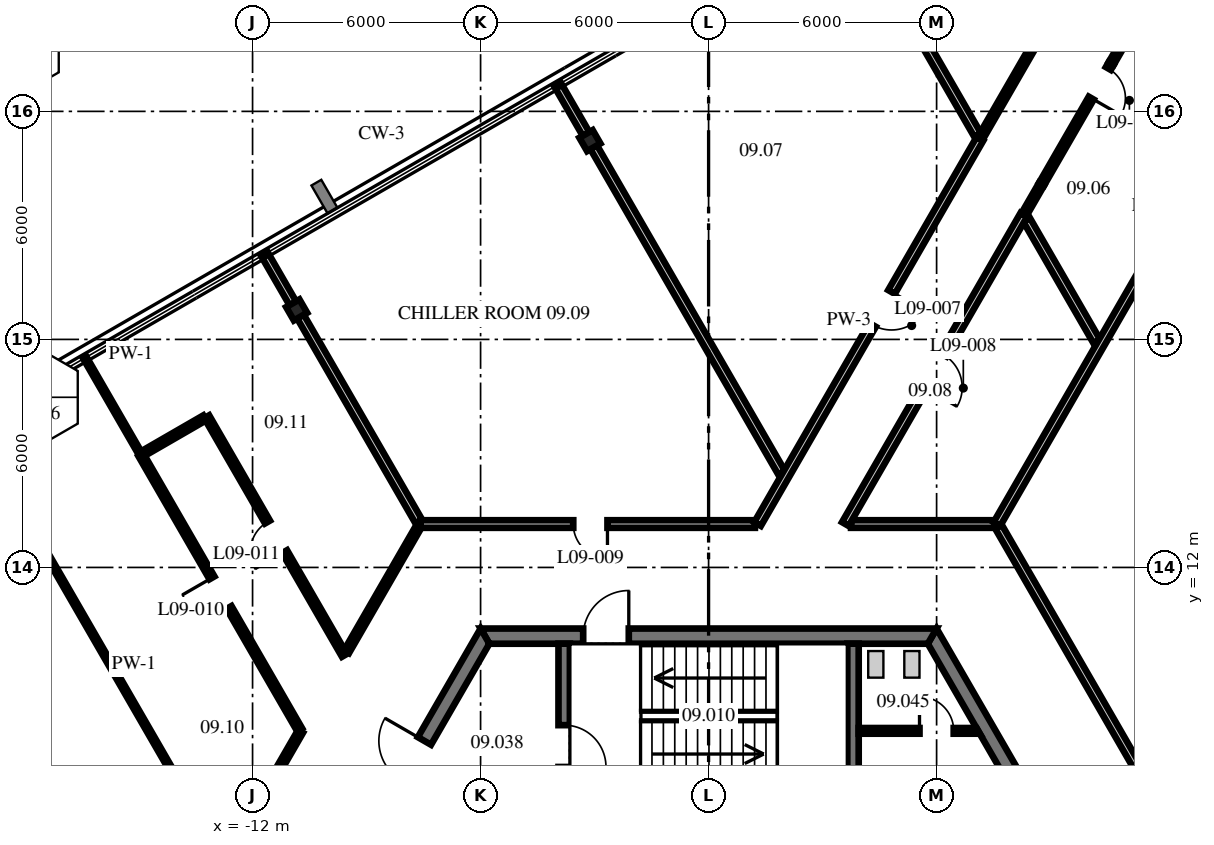
"""IFC4 building model, lengths in metres.
Left out: names, types, materials, properties, quantities, classifications, styles, units other than length and angle.
Written with IfcOpenShell. Run it as: python <this file> out.ifc"""

import sys

from ifc_helpers import new_model, si_unit, direction, frame, frame_2d, origin, origin_2d, place, context, subcontext, project, spatial, polyline, rectangle, i_section, outline, extrude, source, transform, mapped, element, fill, save


model = new_model("IFC4")
c1 = context("Model", 3, precision=1e-05, world=origin(), true_north=direction((0.0, 1.0)))
c2 = subcontext(c1, "Body", "Model", "MODEL_VIEW")
j1 = project(units=[si_unit("LENGTHUNIT", "METRE"), si_unit("PLANEANGLEUNIT", "RADIAN")], contexts=[c1])
p1 = place(None, origin())
s1 = spatial("IfcSite", under=j1, at=p1, CompositionType="ELEMENT")
p2 = place(p1, origin())
s2 = spatial("IfcBuilding", under=s1, at=p2, CompositionType="ELEMENT")
p3 = place(p2, frame((0.0, 0.0, 41.8)))
s3 = spatial("IfcBuildingStorey", under=s2, at=p3, CompositionType="ELEMENT", Elevation=41.8)
m1 = source(origin(), c2, "Body", "SweptSolid", [
    extrude(i_section(OverallWidth=0.404, OverallDepth=0.406, WebThickness=0.027, FlangeThickness=0.044, at=origin_2d()), origin(), (0.0, 0.0, 1.0), 4.3),
])
for number, where, z_axis, x_axis in (
    (1, (-3.124, 23.23, 0.0), (0.0, 0.0, 1.0), (-0.866, -0.5, 0.0)),
    (2, (-10.84, 18.775, 0.0), (0.0, 0.0, 1.0), (-0.866, -0.5, 0.0)),
):
    element("IfcColumn", number, at=place(p3, frame(where, z_axis=z_axis, x_axis=x_axis)), inside=s3, PredefinedType="COLUMN", context=c2, shape_type="MappedRepresentation", body=[
        mapped(m1, transform((0.0, 0.0, 0.0), scale=1.0)),
    ])
m2 = source(origin(), c2, "Body", "SweptSolid", [
    extrude(outline(polyline([(-0.115, -0.2), (11.885, -0.2), (11.654, 0.2), (0.115, 0.2), (-0.115, -0.2)])), origin(), (0.0, 0.0, 1.0), 4.1),
])
p4 = place(p3, frame((11.769, 0.0, 0.0), z_axis=(0.0, 0.0, 1.0), x_axis=(-0.499996592174, 0.866027371285, 0.0)))
e3 = element("IfcWall", 3, at=p4, inside=s3, PredefinedType="SHEAR", context=c2, shape_type="MappedRepresentation", body=[
    mapped(m2, transform((0.0, 0.0, 0.0), scale=1.0)),
])
p5 = place(p4, frame((5.75, 0.0, 0.0)))
e4 = element("IfcOpeningElement", 4, at=p5, cuts=e3, PredefinedType="OPENING", context=c2, shape_type="SweptSolid", body=[
    extrude(rectangle(XDim=1.2, YDim=2.1, at=frame_2d((0.6, 1.05))), frame((0.0, 0.21, 0.0), z_axis=(0.0, -1.0, 0.0), x_axis=(1.0, 0.0, 0.0)), (0.0, 0.0, 1.0), 0.42),
])
p6 = place(p3, frame((5.885, 10.192, 0.0), z_axis=(0.0, 0.0, 1.0), x_axis=(-1.0, 0.0, 0.0)))
e5 = element("IfcWall", 5, at=p6, inside=s3, PredefinedType="SHEAR", context=c2, shape_type="MappedRepresentation", body=[
    mapped(m2, transform((0.0, 0.0, 0.0), scale=1.0)),
])
p7 = place(p6, frame((7.985, 0.0, 0.0)))
e6 = element("IfcOpeningElement", 6, at=p7, cuts=e5, PredefinedType="OPENING", context=c2, shape_type="SweptSolid", body=[
    extrude(rectangle(XDim=1.2, YDim=2.1, at=frame_2d((0.6, 1.05))), frame((0.0, 0.21, 0.0), z_axis=(0.0, -1.0, 0.0), x_axis=(1.0, 0.0, 0.0)), (0.0, 0.0, 1.0), 0.42),
])
p8 = place(p3, frame((-5.885, 10.192, 0.0), z_axis=(0.0, 0.0, 1.0), x_axis=(-0.499996592174, -0.866027371285, 0.0)))
e7 = element("IfcWall", 7, at=p8, inside=s3, PredefinedType="SHEAR", context=c2, shape_type="MappedRepresentation", body=[
    mapped(m2, transform((0.0, 0.0, 0.0), scale=1.0)),
])
p9 = place(p8, frame((3.185, 0.0, 0.0)))
e8 = element("IfcOpeningElement", 8, at=p9, cuts=e7, PredefinedType="OPENING", context=c2, shape_type="SweptSolid", body=[
    extrude(rectangle(XDim=1.2, YDim=2.1, at=frame_2d((0.6, 1.05))), frame((0.0, 0.21, 0.0), z_axis=(0.0, -1.0, 0.0), x_axis=(1.0, 0.0, 0.0)), (0.0, 0.0, 1.0), 0.42),
])
m3 = source(origin(), c2, "Body", "SweptSolid", [
    extrude(outline(polyline([(0.0, -0.15), (0.0, 0.15), (3.804, 0.15), (3.804, -0.15), (0.0, -0.15)])), origin(), (0.0, 0.0, 1.0), 4.1),
])
p10 = place(p3, frame((-3.8, 6.19, 0.0), z_axis=(0.0, 0.0, 1.0), x_axis=(0.0, 1.0, 0.0)))
e9 = element("IfcWall", 9, at=p10, inside=s3, PredefinedType="SHEAR", context=c2, shape_type="MappedRepresentation", body=[
    mapped(m3, transform((0.0, 0.0, 0.0), scale=1.0)),
])
p11 = place(p10, frame((0.56, 0.0, 0.0)))
e10 = element("IfcOpeningElement", 10, at=p11, cuts=e9, PredefinedType="OPENING", context=c2, shape_type="SweptSolid", body=[
    extrude(rectangle(XDim=1.1, YDim=2.1, at=frame_2d((0.55, 1.05))), frame((0.0, 0.16, 0.0), z_axis=(0.0, -1.0, 0.0), x_axis=(1.0, 0.0, 0.0)), (0.0, 0.0, 1.0), 0.32),
])
p12 = place(p3, frame((3.8, 6.19, 0.0), z_axis=(0.0, 0.0, 1.0), x_axis=(0.0, 1.0, 0.0)))
e11 = element("IfcWall", 11, at=p12, inside=s3, PredefinedType="SHEAR", context=c2, shape_type="MappedRepresentation", body=[
    mapped(m3, transform((0.0, 0.0, 0.0), scale=1.0)),
])
m4 = source(origin(), c2, "Body", "SweptSolid", [
    extrude(outline(polyline([(0.0, -0.075), (0.0, 0.075), (3.102, 0.075), (3.188, -0.075), (0.0, -0.075)])), origin(), (0.0, 0.0, 1.0), 4.1),
])
p13 = place(p3, frame((3.95, 7.7, 0.0), z_axis=(0.0, 0.0, 1.0), x_axis=(1.0, 0.0, 0.0)))
e12 = element("IfcWall", 12, at=p13, inside=s3, PredefinedType="PARTITIONING", context=c2, shape_type="MappedRepresentation", body=[
    mapped(m4, transform((0.0, 0.0, 0.0), scale=1.0)),
])
p14 = place(p13, frame((1.6, 0.0, 0.0)))
e13 = element("IfcOpeningElement", 13, at=p14, cuts=e12, PredefinedType="OPENING", context=c2, shape_type="SweptSolid", body=[
    extrude(rectangle(XDim=0.9, YDim=2.1, at=frame_2d((0.45, 1.05))), frame((0.0, 0.085, 0.0), z_axis=(0.0, -1.0, 0.0), x_axis=(1.0, 0.0, 0.0)), (0.0, 0.0, 1.0), 0.17),
])
m5 = source(origin(), c2, "Body", "SweptSolid", [
    extrude(rectangle(XDim=11.455, YDim=0.1, at=frame_2d((5.728, 0.0))), origin(), (0.0, 0.0, 1.0), 3.343),
])
p15 = place(p3, frame((-18.459, 14.153, 0.0), z_axis=(0.0, 0.0, 1.0), x_axis=(0.500008416231, -0.866020544617, 0.0)))
e14 = element("IfcWall", 14, at=p15, inside=s3, PredefinedType="PARTITIONING", context=c2, shape_type="MappedRepresentation", body=[
    mapped(m5, transform((0.0, 0.0, 0.0), scale=1.0)),
])
p16 = place(p3, frame((-16.41, 17.513, 0.0), z_axis=(0.0, 0.0, 1.0), x_axis=(0.500041054325, -0.866001699761, 0.0)))
e15 = element("IfcWall", 15, at=p16, inside=s3, PredefinedType="PARTITIONING", context=c2, shape_type="SweptSolid", body=[
    extrude(rectangle(XDim=2.941, YDim=0.1, at=frame_2d((1.47, 0.0))), origin(), (0.0, 0.0, 1.0), 4.1),
])
p17 = place(p3, frame((-14.939, 14.965, 0.0), z_axis=(0.0, 0.0, 1.0), x_axis=(0.499977133552, -0.866038605332, 0.0)))
e16 = element("IfcWall", 16, at=p17, inside=s3, PredefinedType="PARTITIONING", context=c2, shape_type="SweptSolid", body=[
    extrude(rectangle(XDim=8.354, YDim=0.15, at=frame_2d((4.177, 0.0))), origin(), (0.0, 0.0, 1.0), 4.1),
])
p18 = place(p17, frame((3.74, 0.0, 0.0)))
e17 = element("IfcOpeningElement", 17, at=p18, cuts=e16, PredefinedType="OPENING", context=c2, shape_type="SweptSolid", body=[
    extrude(rectangle(XDim=0.9, YDim=2.1, at=frame_2d((0.45, 1.05))), frame((0.0, 0.085, 0.0), z_axis=(0.0, -1.0, 0.0), x_axis=(1.0, 0.0, 0.0)), (0.0, 0.0, 1.0), 0.17),
])
m6 = source(origin(), c2, "Body", "SweptSolid", [
    extrude(rectangle(XDim=7.249, YDim=0.15, at=frame_2d((3.625, 0.0))), origin(), (0.0, 0.0, 1.0), 4.1),
])
p19 = place(p3, frame((-13.207, 15.965, 0.0), z_axis=(0.0, 0.0, 1.0), x_axis=(0.500014967241, -0.866016762271, 0.0)))
e18 = element("IfcWall", 18, at=p19, inside=s3, PredefinedType="PARTITIONING", context=c2, shape_type="MappedRepresentation", body=[
    mapped(m6, transform((0.0, 0.0, 0.0), scale=1.0)),
])
p20 = place(p19, frame((3.199, 0.0, 0.0)))
e19 = element("IfcOpeningElement", 19, at=p20, cuts=e18, PredefinedType="OPENING", context=c2, shape_type="SweptSolid", body=[
    extrude(rectangle(XDim=0.9, YDim=2.1, at=frame_2d((0.45, 1.05))), frame((0.0, 0.085, 0.0), z_axis=(0.0, -1.0, 0.0), x_axis=(1.0, 0.0, 0.0)), (0.0, 0.0, 1.0), 0.17),
])
m7 = source(origin(), c2, "Body", "SweptSolid", [
    extrude(rectangle(XDim=1.499, YDim=0.2, at=frame_2d((0.749, 0.0))), origin(), (0.0, 0.0, 1.0), 4.1),
])
p21 = place(p3, frame((-11.686, 20.24, 0.0), z_axis=(0.0, 0.0, 1.0), x_axis=(0.499976292358, -0.866039090965, 0.0)))
e20 = element("IfcWall", 20, at=p21, inside=s3, PredefinedType="PARTITIONING", context=c2, shape_type="MappedRepresentation", body=[
    mapped(m7, transform((0.0, 0.0, 0.0), scale=1.0)),
])
m8 = source(origin(), c2, "Body", "SweptSolid", [
    extrude(rectangle(XDim=6.241, YDim=0.2, at=frame_2d((3.121, 0.0))), origin(), (0.0, 0.0, 1.0), 3.488),
])
p22 = place(p3, frame((-10.743, 18.608, 0.0), z_axis=(0.0, 0.0, 1.0), x_axis=(0.499988843237, -0.866031845049, 0.0)))
e21 = element("IfcWall", 21, at=p22, inside=s3, PredefinedType="PARTITIONING", context=c2, shape_type="MappedRepresentation", body=[
    mapped(m8, transform((0.0, 0.0, 0.0), scale=1.0)),
])
m9 = source(origin(), c2, "Body", "SweptSolid", [
    extrude(rectangle(XDim=1.499, YDim=0.2, at=frame_2d((0.75, 0.0))), origin(), (0.0, 0.0, 1.0), 4.1),
])
p23 = place(p3, frame((-3.969, 24.695, 0.0), z_axis=(0.0, 0.0, 1.0), x_axis=(0.499905760005, -0.866079806435, 0.0)))
e22 = element("IfcWall", 22, at=p23, inside=s3, PredefinedType="PARTITIONING", context=c2, shape_type="MappedRepresentation", body=[
    mapped(m9, transform((0.0, 0.0, 0.0), scale=1.0)),
])
m10 = source(origin(), c2, "Body", "SweptSolid", [
    extrude(rectangle(XDim=9.893, YDim=0.2, at=frame_2d((4.947, 0.0))), origin(), (0.0, 0.0, 1.0), 3.343),
])
p24 = place(p3, frame((-3.027, 23.063, 0.0), z_axis=(0.0, 0.0, 1.0), x_axis=(0.499990184253, -0.866031070834, 0.0)))
e23 = element("IfcWall", 23, at=p24, inside=s3, PredefinedType="PARTITIONING", context=c2, shape_type="MappedRepresentation", body=[
    mapped(m10, transform((0.0, 0.0, 0.0), scale=1.0)),
])
p25 = place(p3, frame((7.623, 13.082, 0.0), z_axis=(0.0, 0.0, 1.0), x_axis=(0.499985944963, -0.866033518312, 0.0)))
e24 = element("IfcWall", 24, at=p25, inside=s3, PredefinedType="PARTITIONING", context=c2, shape_type="SweptSolid", body=[
    extrude(rectangle(XDim=15.105, YDim=0.2, at=frame_2d((7.553, 0.0))), origin(), (0.0, 0.0, 1.0), 4.1),
])
p26 = place(p25, frame((9.455, 0.0, 0.0)))
e25 = element("IfcOpeningElement", 25, at=p26, cuts=e24, PredefinedType="OPENING", context=c2, shape_type="SweptSolid", body=[
    extrude(rectangle(XDim=1.0, YDim=2.1, at=frame_2d((0.5, 1.05))), frame((0.0, 0.11, 0.0), z_axis=(0.0, -1.0, 0.0), x_axis=(1.0, 0.0, 0.0)), (0.0, 0.0, 1.0), 0.22),
])
m11 = source(origin(), c2, "Body", "SweptSolid", [
    extrude(rectangle(XDim=4.779, YDim=0.2, at=frame_2d((2.389, 0.0))), origin(), (0.0, 0.0, 1.0), 3.488),
])
p27 = place(p3, frame((4.689, 27.518, 0.0), z_axis=(0.0, 0.0, 1.0), x_axis=(0.499990736708, -0.866030751883, 0.0)))
e26 = element("IfcWall", 26, at=p27, inside=s3, PredefinedType="PARTITIONING", context=c2, shape_type="MappedRepresentation", body=[
    mapped(m11, transform((0.0, 0.0, 0.0), scale=1.0)),
])
p28 = place(p3, frame((8.369, 21.145, 0.0), z_axis=(0.0, 0.0, 1.0), x_axis=(0.499982117899, -0.866035727774, 0.0)))
e27 = element("IfcWall", 27, at=p28, inside=s3, PredefinedType="PARTITIONING", context=c2, shape_type="SweptSolid", body=[
    extrude(rectangle(XDim=3.69, YDim=0.2, at=frame_2d((1.845, 0.0))), origin(), (0.0, 0.0, 1.0), 4.1),
])
p29 = place(p3, frame((-7.588, 13.142, 0.0), z_axis=(0.0, 0.0, 1.0), x_axis=(1.0, 0.0, 0.0)))
e28 = element("IfcWall", 28, at=p29, inside=s3, PredefinedType="PARTITIONING", context=c2, shape_type="SweptSolid", body=[
    extrude(rectangle(XDim=8.807, YDim=0.2, at=frame_2d((4.403, 0.0))), origin(), (0.0, 0.0, 1.0), 4.1),
])
p30 = place(p29, frame((4.027, 0.0, 0.0)))
e29 = element("IfcOpeningElement", 29, at=p30, cuts=e28, PredefinedType="OPENING", context=c2, shape_type="SweptSolid", body=[
    extrude(rectangle(XDim=0.9, YDim=2.1, at=frame_2d((0.45, 1.05))), frame((0.0, 0.11, 0.0), z_axis=(0.0, -1.0, 0.0), x_axis=(1.0, 0.0, 0.0)), (0.0, 0.0, 1.0), 0.22),
])
p31 = place(p3, frame((3.748, 13.142, 0.0), z_axis=(0.0, 0.0, 1.0), x_axis=(1.0, 0.0, 0.0)))
e30 = element("IfcWall", 30, at=p31, inside=s3, PredefinedType="PARTITIONING", context=c2, shape_type="SweptSolid", body=[
    extrude(rectangle(XDim=3.769, YDim=0.2, at=frame_2d((1.885, 0.0))), origin(), (0.0, 0.0, 1.0), 4.1),
])
m12 = source(origin(), c2, "Body", "SweptSolid", [
    extrude(rectangle(XDim=1.89, YDim=0.15, at=frame_2d((0.945, 0.0))), origin(), (0.0, 0.0, 1.0), 4.1),
])
p32 = place(p3, frame((-14.896, 14.991, 0.0), z_axis=(0.0, 0.0, 1.0), x_axis=(0.866000578957, 0.500042995397, 0.0)))
e31 = element("IfcWall", 31, at=p32, inside=s3, PredefinedType="PARTITIONING", context=c2, shape_type="MappedRepresentation", body=[
    mapped(m12, transform((0.0, 0.0, 0.0), scale=1.0)),
])
p33 = place(p3, frame((7.588, 13.142, 0.0), z_axis=(0.0, 0.0, 1.0), x_axis=(0.500005822324, 0.866022042238, 0.0)))
e32 = element("IfcWall", 32, at=p33, inside=s3, PredefinedType="PARTITIONING", context=c2, shape_type="SweptSolid", body=[
    extrude(rectangle(XDim=18.62, YDim=0.2, at=frame_2d((9.31, 0.0))), origin(), (0.0, 0.0, 1.0), 4.1),
])
p34 = place(p3, frame((3.598, 13.142, 0.0), z_axis=(0.0, 0.0, 1.0), x_axis=(0.499987908195, 0.866032384879, 0.0)))
e33 = element("IfcWall", 33, at=p34, inside=s3, PredefinedType="PARTITIONING", context=c2, shape_type="SweptSolid", body=[
    extrude(rectangle(XDim=9.394, YDim=0.2, at=frame_2d((4.697, 0.0))), origin(), (0.0, 0.0, 1.0), 4.1),
])
p35 = place(p34, frame((4.15, 0.0, 0.0)))
e34 = element("IfcOpeningElement", 34, at=p35, cuts=e33, PredefinedType="OPENING", context=c2, shape_type="SweptSolid", body=[
    extrude(rectangle(XDim=1.0, YDim=2.1, at=frame_2d((0.5, 1.05))), frame((0.0, 0.11, 0.0), z_axis=(0.0, -1.0, 0.0), x_axis=(1.0, 0.0, 0.0)), (0.0, 0.0, 1.0), 0.22),
])
p36 = place(p3, frame((8.295, 21.278, 0.0), z_axis=(0.0, 0.0, 1.0), x_axis=(0.500002371706, 0.866024034475, 0.0)))
e35 = element("IfcWall", 35, at=p36, inside=s3, PredefinedType="PARTITIONING", context=c2, shape_type="SweptSolid", body=[
    extrude(rectangle(XDim=0.931, YDim=0.15, at=frame_2d((0.466, 0.0))), origin(), (0.0, 0.0, 1.0), 4.1),
])
p37 = place(p3, frame((8.761, 22.084, 0.0), z_axis=(0.0, 0.0, 1.0), x_axis=(0.499985736139, 0.866033638872, 0.0)))
e36 = element("IfcWall", 36, at=p37, inside=s3, PredefinedType="PARTITIONING", context=c2, shape_type="SweptSolid", body=[
    extrude(rectangle(XDim=3.666, YDim=0.15, at=frame_2d((1.833, 0.0))), origin(), (0.0, 0.0, 1.0), 3.157),
])
p38 = place(p37, frame((2.615, 0.0, 0.0)))
e37 = element("IfcOpeningElement", 37, at=p38, cuts=e36, PredefinedType="OPENING", context=c2, shape_type="SweptSolid", body=[
    extrude(rectangle(XDim=0.9, YDim=2.1, at=frame_2d((0.45, 1.05))), frame((0.0, 0.085, 0.0), z_axis=(0.0, -1.0, 0.0), x_axis=(1.0, 0.0, 0.0)), (0.0, 0.0, 1.0), 0.17),
])
p39 = place(p3, frame((10.594, 25.259, 0.0), z_axis=(0.0, 0.0, 1.0), x_axis=(0.500002112793, 0.866024183959, 0.0)))
e38 = element("IfcWall", 38, at=p39, inside=s3, PredefinedType="PARTITIONING", context=c2, shape_type="SweptSolid", body=[
    extrude(rectangle(XDim=5.567, YDim=0.15, at=frame_2d((2.783, 0.0))), origin(), (0.0, 0.0, 1.0), 4.1),
])
p40 = place(p39, frame((4.081, 0.0, 0.0)))
e39 = element("IfcOpeningElement", 39, at=p40, cuts=e38, PredefinedType="OPENING", context=c2, shape_type="SweptSolid", body=[
    extrude(rectangle(XDim=0.9, YDim=2.1, at=frame_2d((0.45, 1.05))), frame((0.0, 0.085, 0.0), z_axis=(0.0, -1.0, 0.0), x_axis=(1.0, 0.0, 0.0)), (0.0, 0.0, 1.0), 0.17),
])
p41 = place(p3, frame((1.289, 13.142, 0.0), z_axis=(0.0, 0.0, 1.0), x_axis=(0.499995716753, 0.866027876704, 0.0)))
e40 = element("IfcWall", 40, at=p41, inside=s3, PredefinedType="PARTITIONING", context=c2, shape_type="SweptSolid", body=[
    extrude(rectangle(XDim=11.704, YDim=0.2, at=frame_2d((5.852, 0.0))), origin(), (0.0, 0.0, 1.0), 4.1),
])
p42 = place(p41, frame((6.05, 0.0, 0.0)))
e41 = element("IfcOpeningElement", 41, at=p42, cuts=e40, PredefinedType="OPENING", context=c2, shape_type="SweptSolid", body=[
    extrude(rectangle(XDim=1.0, YDim=2.1, at=frame_2d((0.5, 1.05))), frame((0.0, 0.11, 0.0), z_axis=(0.0, -1.0, 0.0), x_axis=(1.0, 0.0, 0.0)), (0.0, 0.0, 1.0), 0.22),
])
p43 = place(p3, frame((7.141, 23.278, 0.0), z_axis=(0.0, 0.0, 1.0), x_axis=(0.500012266612, 0.866018321537, 0.0)))
e42 = element("IfcWall", 42, at=p43, inside=s3, PredefinedType="PARTITIONING", context=c2, shape_type="SweptSolid", body=[
    extrude(rectangle(XDim=7.681, YDim=0.15, at=frame_2d((3.84, 0.0))), origin(), (0.0, 0.0, 1.0), 4.1),
])
p44 = place(p43, frame((3.433, 0.0, 0.0)))
e43 = element("IfcOpeningElement", 43, at=p44, cuts=e42, PredefinedType="OPENING", context=c2, shape_type="SweptSolid", body=[
    extrude(rectangle(XDim=0.9, YDim=2.1, at=frame_2d((0.45, 1.05))), frame((0.0, 0.085, 0.0), z_axis=(0.0, -1.0, 0.0), x_axis=(1.0, 0.0, 0.0)), (0.0, 0.0, 1.0), 0.17),
])
p45 = place(p3, frame((-15.175, 0.0, 0.0), z_axis=(0.0, 0.0, 1.0), x_axis=(0.499999423938, 0.866025736374, 0.0)))
e44 = element("IfcWall", 44, at=p45, inside=s3, PredefinedType="PARTITIONING", context=c2, shape_type="SweptSolid", body=[
    extrude(rectangle(XDim=8.876, YDim=0.15, at=frame_2d((4.438, 0.0))), origin(), (0.0, 0.0, 1.0), 4.1),
])
p46 = place(p45, frame((2.037, 0.0, 0.0)))
e45 = element("IfcOpeningElement", 45, at=p46, cuts=e44, PredefinedType="OPENING", context=c2, shape_type="SweptSolid", body=[
    extrude(rectangle(XDim=0.9, YDim=2.1, at=frame_2d((0.45, 1.05))), frame((0.0, 0.085, 0.0), z_axis=(0.0, -1.0, 0.0), x_axis=(1.0, 0.0, 0.0)), (0.0, 0.0, 1.0), 0.17),
])
p47 = place(p3, frame((-9.527, 9.783, 0.0), z_axis=(0.0, 0.0, 1.0), x_axis=(0.50001277644, 0.866018027177, 0.0)))
e46 = element("IfcWall", 46, at=p47, inside=s3, PredefinedType="PARTITIONING", context=c2, shape_type="SweptSolid", body=[
    extrude(rectangle(XDim=3.81, YDim=0.15, at=frame_2d((1.905, 0.0))), origin(), (0.0, 0.0, 1.0), 4.1),
])
p48 = place(p7, frame((1.2, 0.0, 0.0), z_axis=(0.0, 0.0, 1.0), x_axis=(-1.0, 0.0, 0.0)))
e47 = element("IfcDoor", 47, at=p48, inside=s3, OperationType="SINGLE_SWING_RIGHT", PredefinedType="DOOR", context=c2, shape_type="SweptSolid", body=[
    extrude(rectangle(XDim=1.2, YDim=2.1, at=frame_2d((0.6, 1.05))), frame((0.0, 0.025, 0.0), z_axis=(0.0, -1.0, 0.0), x_axis=(1.0, 0.0, 0.0)), (0.0, 0.0, 1.0), 0.05),
])
fill(e6, e47)
p49 = place(p9, frame((1.2, 0.0, 0.0), z_axis=(0.0, 0.0, 1.0), x_axis=(-1.0, 0.0, 0.0)))
e48 = element("IfcDoor", 48, at=p49, inside=s3, OperationType="SINGLE_SWING_RIGHT", PredefinedType="DOOR", context=c2, shape_type="SweptSolid", body=[
    extrude(rectangle(XDim=1.2, YDim=2.1, at=frame_2d((0.6, 1.05))), frame((0.0, 0.025, 0.0), z_axis=(0.0, -1.0, 0.0), x_axis=(1.0, 0.0, 0.0)), (0.0, 0.0, 1.0), 0.05),
])
fill(e8, e48)
p50 = place(p11, frame((1.1, 0.0, 0.0), z_axis=(0.0, 0.0, 1.0), x_axis=(-1.0, 0.0, 0.0)))
e49 = element("IfcDoor", 49, at=p50, inside=s3, OperationType="SINGLE_SWING_RIGHT", PredefinedType="DOOR", context=c2, shape_type="SweptSolid", body=[
    extrude(rectangle(XDim=1.1, YDim=2.1, at=frame_2d((0.55, 1.05))), frame((0.0, 0.025, 0.0), z_axis=(0.0, -1.0, 0.0), x_axis=(1.0, 0.0, 0.0)), (0.0, 0.0, 1.0), 0.05),
])
fill(e10, e49)
p51 = place(p14, origin())
e50 = element("IfcDoor", 50, at=p51, inside=s3, OperationType="SINGLE_SWING_LEFT", PredefinedType="DOOR", context=c2, shape_type="SweptSolid", body=[
    extrude(rectangle(XDim=0.9, YDim=2.1, at=frame_2d((0.45, 1.05))), frame((0.0, 0.025, 0.0), z_axis=(0.0, -1.0, 0.0), x_axis=(1.0, 0.0, 0.0)), (0.0, 0.0, 1.0), 0.05),
])
fill(e13, e50)
p52 = place(p38, origin())
e51 = element("IfcDoor", 51, at=p52, inside=s3, OperationType="SINGLE_SWING_RIGHT", PredefinedType="DOOR", context=c2, shape_type="SweptSolid", body=[
    extrude(rectangle(XDim=0.9, YDim=2.1, at=frame_2d((0.45, 1.05))), frame((0.0, 0.025, 0.0), z_axis=(0.0, -1.0, 0.0), x_axis=(1.0, 0.0, 0.0)), (0.0, 0.0, 1.0), 0.05),
])
fill(e37, e51)
p53 = place(p42, origin())
e52 = element("IfcDoor", 52, at=p53, inside=s3, OperationType="SINGLE_SWING_RIGHT", PredefinedType="DOOR", context=c2, shape_type="SweptSolid", body=[
    extrude(rectangle(XDim=1.0, YDim=2.1, at=frame_2d((0.5, 1.05))), frame((0.0, 0.025, 0.0), z_axis=(0.0, -1.0, 0.0), x_axis=(1.0, 0.0, 0.0)), (0.0, 0.0, 1.0), 0.05),
])
fill(e41, e52)
p54 = place(p35, origin())
e53 = element("IfcDoor", 53, at=p54, inside=s3, OperationType="SINGLE_SWING_RIGHT", PredefinedType="DOOR", context=c2, shape_type="SweptSolid", body=[
    extrude(rectangle(XDim=1.0, YDim=2.1, at=frame_2d((0.5, 1.05))), frame((0.0, 0.025, 0.0), z_axis=(0.0, -1.0, 0.0), x_axis=(1.0, 0.0, 0.0)), (0.0, 0.0, 1.0), 0.05),
])
fill(e34, e53)
p55 = place(p30, origin())
e54 = element("IfcDoor", 54, at=p55, inside=s3, OperationType="SINGLE_SWING_RIGHT", PredefinedType="DOOR", context=c2, shape_type="SweptSolid", body=[
    extrude(rectangle(XDim=0.9, YDim=2.1, at=frame_2d((0.45, 1.05))), frame((0.0, 0.025, 0.0), z_axis=(0.0, -1.0, 0.0), x_axis=(1.0, 0.0, 0.0)), (0.0, 0.0, 1.0), 0.05),
])
fill(e29, e54)
p56 = place(p18, origin())
e55 = element("IfcDoor", 55, at=p56, inside=s3, OperationType="SINGLE_SWING_RIGHT", PredefinedType="DOOR", context=c2, shape_type="SweptSolid", body=[
    extrude(rectangle(XDim=0.9, YDim=2.1, at=frame_2d((0.45, 1.05))), frame((0.0, 0.025, 0.0), z_axis=(0.0, -1.0, 0.0), x_axis=(1.0, 0.0, 0.0)), (0.0, 0.0, 1.0), 0.05),
])
fill(e17, e55)
p57 = place(p20, origin())
e56 = element("IfcDoor", 56, at=p57, inside=s3, OperationType="SINGLE_SWING_RIGHT", PredefinedType="DOOR", context=c2, shape_type="SweptSolid", body=[
    extrude(rectangle(XDim=0.9, YDim=2.1, at=frame_2d((0.45, 1.05))), frame((0.0, 0.025, 0.0), z_axis=(0.0, -1.0, 0.0), x_axis=(1.0, 0.0, 0.0)), (0.0, 0.0, 1.0), 0.05),
])
fill(e19, e56)
save(model, sys.argv[1])
